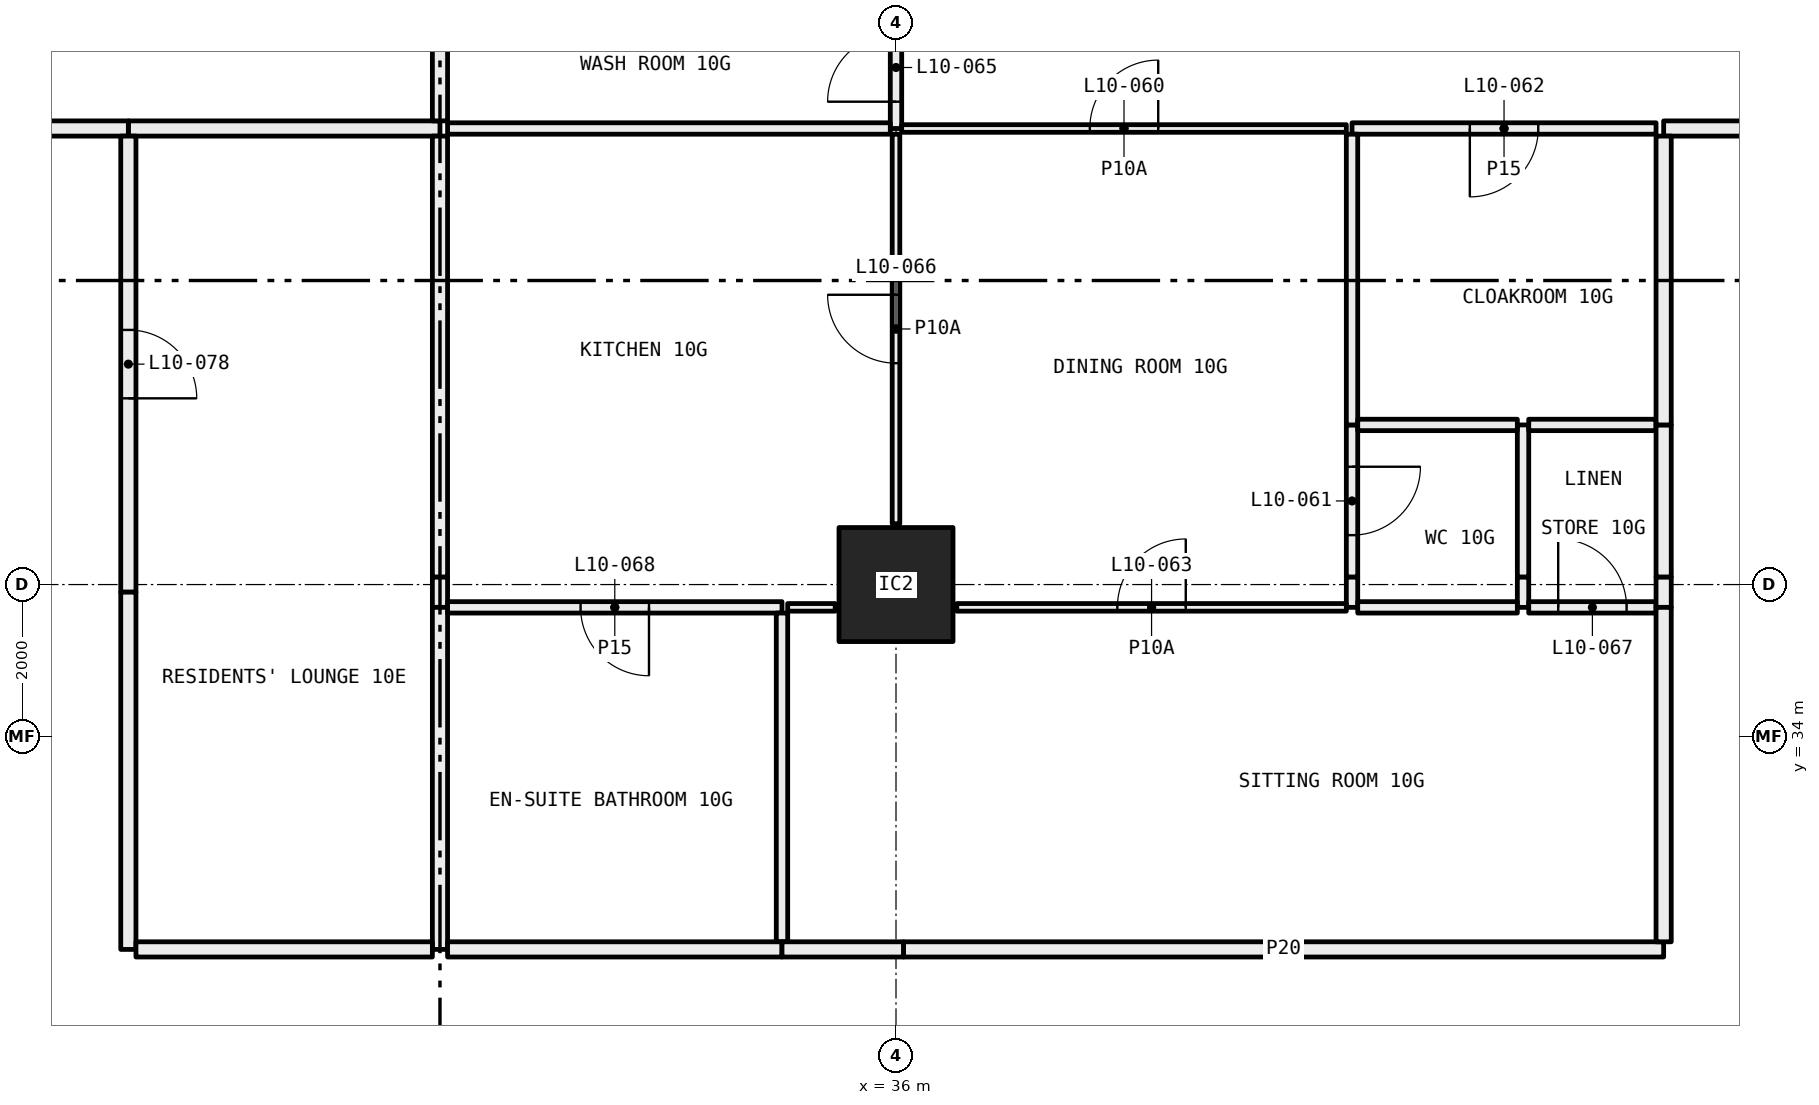
"""IFC4 building model, lengths in metres.
Left out: names, types, materials, properties, quantities, classifications, styles, units other than length and angle.
Written with IfcOpenShell. Run it as: python <this file> out.ifc"""

import sys

from ifc_helpers import new_model, si_unit, direction, frame, frame_2d, origin, origin_2d, place, context, subcontext, project, spatial, rectangle, hollow_rectangle, extrude, element, fill, save


model = new_model("IFC4")
c1 = context("Model", 3, precision=1e-05, world=origin(), true_north=direction((0.0, 1.0)))
c2 = subcontext(c1, "Body", "Model", "MODEL_VIEW")
j1 = project(units=[si_unit("LENGTHUNIT", "METRE"), si_unit("PLANEANGLEUNIT", "RADIAN")], contexts=[c1])
p1 = place(None, origin())
s1 = spatial("IfcSite", under=j1, at=p1, CompositionType="ELEMENT")
p2 = place(p1, origin())
s2 = spatial("IfcBuilding", under=s1, at=p2, CompositionType="ELEMENT")
p3 = place(p2, frame((0.0, 0.0, 47.25)))
s3 = spatial("IfcBuildingStorey", under=s2, at=p3, CompositionType="ELEMENT", Elevation=47.25)
p4 = place(p3, frame((36.0, 36.0, 0.0), z_axis=(0.0, 0.0, 1.0), x_axis=(1.0, 0.0, 0.0)))
e1 = element("IfcColumn", 1, at=p4, inside=s3, PredefinedType="COLUMN", context=c2, shape_type="SweptSolid", body=[
    extrude(hollow_rectangle(XDim=1.5, YDim=1.5, WallThickness=0.065, at=origin_2d()), origin(), (0.0, 0.0, 1.0), 3.05),
])
p5 = place(p3, frame((25.9, 42.0, 0.0), z_axis=(0.0, 0.0, 1.0), x_axis=(1.0, 0.0, 0.0)))
e2 = element("IfcWall", 2, at=p5, inside=s3, PredefinedType="PARTITIONING", context=c2, shape_type="SweptSolid", body=[
    extrude(rectangle(XDim=4.1, YDim=0.2, at=frame_2d((2.05, 0.0))), origin(), (0.0, 0.0, 1.0), 3.05),
])
p6 = place(p3, frame((30.0, 42.1, 0.0), z_axis=(0.0, 0.0, 1.0), x_axis=(0.0, 1.0, 0.0)))
e3 = element("IfcWall", 3, at=p6, inside=s3, PredefinedType="PARTITIONING", context=c2, shape_type="SweptSolid", body=[
    extrude(rectangle(XDim=1.58, YDim=0.2, at=frame_2d((0.79, 0.0))), origin(), (0.0, 0.0, 1.0), 3.05),
])
p7 = place(p3, frame((24.0, 42.0, 0.0), z_axis=(0.0, 0.0, 1.0), x_axis=(1.0, 0.0, 0.0)))
e4 = element("IfcWall", 4, at=p7, inside=s3, PredefinedType="PARTITIONING", context=c2, shape_type="SweptSolid", body=[
    extrude(rectangle(XDim=1.9, YDim=0.2, at=frame_2d((0.95, 0.0))), origin(), (0.0, 0.0, 1.0), 3.05),
])
p8 = place(p3, frame((30.0, 35.7, 0.0), z_axis=(0.0, 0.0, 1.0), x_axis=(0.0, 1.0, 0.0)))
e5 = element("IfcWall", 5, at=p8, inside=s3, PredefinedType="PARTITIONING", context=c2, shape_type="SweptSolid", body=[
    extrude(rectangle(XDim=0.4, YDim=0.2, at=frame_2d((0.2, 0.0))), origin(), (0.0, 0.0, 1.0), 2.45),
])
p9 = place(p3, frame((30.0, 36.1, 0.0), z_axis=(0.0, 0.0, 1.0), x_axis=(0.0, 1.0, 0.0)))
e6 = element("IfcWall", 6, at=p9, inside=s3, PredefinedType="PARTITIONING", context=c2, shape_type="SweptSolid", body=[
    extrude(rectangle(XDim=5.8, YDim=0.2, at=frame_2d((2.9, 0.0))), origin(), (0.0, 0.0, 1.0), 3.05),
])
p10 = place(p3, frame((30.0, 31.2, 0.0), z_axis=(0.0, 0.0, 1.0), x_axis=(0.0, 1.0, 0.0)))
e7 = element("IfcWall", 7, at=p10, inside=s3, PredefinedType="PARTITIONING", context=c2, shape_type="SweptSolid", body=[
    extrude(rectangle(XDim=4.5, YDim=0.2, at=frame_2d((2.25, 0.0))), origin(), (0.0, 0.0, 1.0), 3.05),
])
p11 = place(p3, frame((25.9, 41.9, 0.0), z_axis=(0.0, 0.0, 1.0), x_axis=(0.0, -1.0, 0.0)))
e8 = element("IfcWall", 8, at=p11, inside=s3, PredefinedType="PARTITIONING", context=c2, shape_type="SweptSolid", body=[
    extrude(rectangle(XDim=6.0, YDim=0.2, at=frame_2d((3.0, 0.0))), origin(), (0.0, 0.0, 1.0), 2.45),
])
p12 = place(p11, frame((2.55, 0.0, 0.0)))
e9 = element("IfcOpeningElement", 9, at=p12, cuts=e8, PredefinedType="OPENING", context=c2, shape_type="SweptSolid", body=[
    extrude(rectangle(XDim=0.9, YDim=2.1, at=frame_2d((0.45, 1.05))), frame((0.0, 0.11, 0.0), z_axis=(0.0, -1.0, 0.0), x_axis=(1.0, 0.0, 0.0)), (0.0, 0.0, 1.0), 0.22),
])
p13 = place(p3, frame((25.9, 35.9, 0.0), z_axis=(0.0, 0.0, 1.0), x_axis=(0.0, -1.0, 0.0)))
e10 = element("IfcWall", 10, at=p13, inside=s3, PredefinedType="PARTITIONING", context=c2, shape_type="SweptSolid", body=[
    extrude(rectangle(XDim=4.7, YDim=0.2, at=frame_2d((2.35, 0.0))), origin(), (0.0, 0.0, 1.0), 3.05),
])
p14 = place(p3, frame((26.0, 31.2, 0.0), z_axis=(0.0, 0.0, 1.0), x_axis=(1.0, 0.0, 0.0)))
e11 = element("IfcWall", 11, at=p14, inside=s3, PredefinedType="PARTITIONING", context=c2, shape_type="SweptSolid", body=[
    extrude(rectangle(XDim=3.9, YDim=0.2, at=frame_2d((1.95, 0.0))), origin(), (0.0, 0.0, 1.0), 3.05),
])
p15 = place(p3, frame((36.0, 42.0, 0.0), z_axis=(0.0, 0.0, 1.0), x_axis=(0.0, 1.0, 0.0)))
e12 = element("IfcWall", 12, at=p15, inside=s3, PredefinedType="PARTITIONING", context=c2, shape_type="SweptSolid", body=[
    extrude(rectangle(XDim=1.605, YDim=0.15, at=frame_2d((0.802, 0.0))), origin(), (0.0, 0.0, 1.0), 2.45),
])
p16 = place(p15, frame((0.353, 0.0, 0.0)))
e13 = element("IfcOpeningElement", 13, at=p16, cuts=e12, PredefinedType="OPENING", context=c2, shape_type="SweptSolid", body=[
    extrude(rectangle(XDim=0.9, YDim=2.1, at=frame_2d((0.45, 1.05))), frame((0.0, 0.085, 0.0), z_axis=(0.0, -1.0, 0.0), x_axis=(1.0, 0.0, 0.0)), (0.0, 0.0, 1.0), 0.17),
])
p17 = place(p3, frame((30.1, 42.0, 0.0), z_axis=(0.0, 0.0, 1.0), x_axis=(1.0, 0.0, 0.0)))
e14 = element("IfcWall", 14, at=p17, inside=s3, PredefinedType="PARTITIONING", context=c2, shape_type="SweptSolid", body=[
    extrude(rectangle(XDim=5.825, YDim=0.15, at=frame_2d((2.913, 0.0))), origin(), (0.0, 0.0, 1.0), 2.45),
])
p18 = place(p3, frame((36.075, 42.0, 0.0), z_axis=(0.0, 0.0, 1.0), x_axis=(1.0, 0.0, 0.0)))
e15 = element("IfcWall", 15, at=p18, inside=s3, PredefinedType="PARTITIONING", context=c2, shape_type="SweptSolid", body=[
    extrude(rectangle(XDim=5.85, YDim=0.1, at=frame_2d((2.925, 0.0))), origin(), (0.0, 0.0, 1.0), 2.45),
])
p19 = place(p18, frame((2.475, 0.0, 0.0)))
e16 = element("IfcOpeningElement", 16, at=p19, cuts=e15, PredefinedType="OPENING", context=c2, shape_type="SweptSolid", body=[
    extrude(rectangle(XDim=0.9, YDim=2.1, at=frame_2d((0.45, 1.05))), frame((0.0, 0.06, 0.0), z_axis=(0.0, -1.0, 0.0), x_axis=(1.0, 0.0, 0.0)), (0.0, 0.0, 1.0), 0.12),
])
p20 = place(p3, frame((42.0, 42.0, 0.0), z_axis=(0.0, 0.0, 1.0), x_axis=(1.0, 0.0, 0.0)))
e17 = element("IfcWall", 17, at=p20, inside=s3, PredefinedType="PARTITIONING", context=c2, shape_type="SweptSolid", body=[
    extrude(rectangle(XDim=4.0, YDim=0.15, at=frame_2d((2.0, 0.0))), origin(), (0.0, 0.0, 1.0), 3.05),
])
p21 = place(p20, frame((1.55, 0.0, 0.0)))
e18 = element("IfcOpeningElement", 18, at=p21, cuts=e17, PredefinedType="OPENING", context=c2, shape_type="SweptSolid", body=[
    extrude(rectangle(XDim=0.9, YDim=2.1, at=frame_2d((0.45, 1.05))), frame((0.0, 0.085, 0.0), z_axis=(0.0, -1.0, 0.0), x_axis=(1.0, 0.0, 0.0)), (0.0, 0.0, 1.0), 0.17),
])
p22 = place(p3, frame((46.1, 42.0, 0.0), z_axis=(0.0, 0.0, 1.0), x_axis=(1.0, 0.0, 0.0)))
e19 = element("IfcWall", 19, at=p22, inside=s3, PredefinedType="PARTITIONING", context=c2, shape_type="SweptSolid", body=[
    extrude(rectangle(XDim=1.9, YDim=0.2, at=frame_2d((0.95, 0.0))), origin(), (0.0, 0.0, 1.0), 3.05),
])
p23 = place(p3, frame((36.0, 36.8, 0.0), z_axis=(0.0, 0.0, 1.0), x_axis=(0.0, 1.0, 0.0)))
e20 = element("IfcWall", 20, at=p23, inside=s3, PredefinedType="PARTITIONING", context=c2, shape_type="SweptSolid", body=[
    extrude(rectangle(XDim=5.125, YDim=0.1, at=frame_2d((2.562, 0.0))), origin(), (0.0, 0.0, 1.0), 2.45),
])
p24 = place(p23, frame((2.113, 0.0, 0.0)))
e21 = element("IfcOpeningElement", 21, at=p24, cuts=e20, PredefinedType="OPENING", context=c2, shape_type="SweptSolid", body=[
    extrude(rectangle(XDim=0.9, YDim=2.1, at=frame_2d((0.45, 1.05))), frame((0.0, 0.06, 0.0), z_axis=(0.0, -1.0, 0.0), x_axis=(1.0, 0.0, 0.0)), (0.0, 0.0, 1.0), 0.12),
])
p25 = place(p3, frame((30.1, 35.7, 0.0), z_axis=(0.0, 0.0, 1.0), x_axis=(1.0, 0.0, 0.0)))
e22 = element("IfcWall", 22, at=p25, inside=s3, PredefinedType="PARTITIONING", context=c2, shape_type="SweptSolid", body=[
    extrude(rectangle(XDim=4.4, YDim=0.15, at=frame_2d((2.2, 0.0))), origin(), (0.0, 0.0, 1.0), 3.05),
])
p26 = place(p25, frame((1.75, 0.0, 0.0)))
e23 = element("IfcOpeningElement", 23, at=p26, cuts=e22, PredefinedType="OPENING", context=c2, shape_type="SweptSolid", body=[
    extrude(rectangle(XDim=0.9, YDim=2.1, at=frame_2d((0.45, 1.05))), frame((0.0, 0.085, 0.0), z_axis=(0.0, -1.0, 0.0), x_axis=(1.0, 0.0, 0.0)), (0.0, 0.0, 1.0), 0.17),
])
p27 = place(p3, frame((34.575, 35.7, 0.0), z_axis=(0.0, 0.0, 1.0), x_axis=(1.0, 0.0, 0.0)))
e24 = element("IfcWall", 24, at=p27, inside=s3, PredefinedType="PARTITIONING", context=c2, shape_type="SweptSolid", body=[
    extrude(rectangle(XDim=0.625, YDim=0.1, at=frame_2d((0.312, 0.0))), origin(), (0.0, 0.0, 1.0), 3.05),
])
p28 = place(p3, frame((42.0, 35.7, 0.0), z_axis=(0.0, 0.0, 1.0), x_axis=(0.0, 1.0, 0.0)))
e25 = element("IfcWall", 25, at=p28, inside=s3, PredefinedType="PARTITIONING", context=c2, shape_type="SweptSolid", body=[
    extrude(rectangle(XDim=0.4, YDim=0.15, at=frame_2d((0.2, 0.0))), origin(), (0.0, 0.0, 1.0), 2.45),
])
p29 = place(p3, frame((42.0, 36.1, 0.0), z_axis=(0.0, 0.0, 1.0), x_axis=(0.0, 1.0, 0.0)))
e26 = element("IfcWall", 26, at=p29, inside=s3, PredefinedType="PARTITIONING", context=c2, shape_type="SweptSolid", body=[
    extrude(rectangle(XDim=2.0, YDim=0.15, at=frame_2d((1.0, 0.0))), origin(), (0.0, 0.0, 1.0), 3.05),
])
p30 = place(p29, frame((0.55, 0.0, 0.0)))
e27 = element("IfcOpeningElement", 27, at=p30, cuts=e26, PredefinedType="OPENING", context=c2, shape_type="SweptSolid", body=[
    extrude(rectangle(XDim=0.9, YDim=2.1, at=frame_2d((0.45, 1.05))), frame((0.0, 0.085, 0.0), z_axis=(0.0, -1.0, 0.0), x_axis=(1.0, 0.0, 0.0)), (0.0, 0.0, 1.0), 0.17),
])
p31 = place(p3, frame((42.0, 38.1, 0.0), z_axis=(0.0, 0.0, 1.0), x_axis=(0.0, 1.0, 0.0)))
e28 = element("IfcWall", 28, at=p31, inside=s3, PredefinedType="PARTITIONING", context=c2, shape_type="SweptSolid", body=[
    extrude(rectangle(XDim=3.825, YDim=0.15, at=frame_2d((1.913, 0.0))), origin(), (0.0, 0.0, 1.0), 3.05),
])
p32 = place(p3, frame((36.8, 35.7, 0.0), z_axis=(0.0, 0.0, 1.0), x_axis=(1.0, 0.0, 0.0)))
e29 = element("IfcWall", 29, at=p32, inside=s3, PredefinedType="PARTITIONING", context=c2, shape_type="SweptSolid", body=[
    extrude(rectangle(XDim=5.125, YDim=0.1, at=frame_2d((2.562, 0.0))), origin(), (0.0, 0.0, 1.0), 3.05),
])
p33 = place(p32, frame((2.113, 0.0, 0.0)))
e30 = element("IfcOpeningElement", 30, at=p33, cuts=e29, PredefinedType="OPENING", context=c2, shape_type="SweptSolid", body=[
    extrude(rectangle(XDim=0.9, YDim=2.1, at=frame_2d((0.45, 1.05))), frame((0.0, 0.06, 0.0), z_axis=(0.0, -1.0, 0.0), x_axis=(1.0, 0.0, 0.0)), (0.0, 0.0, 1.0), 0.12),
])
p34 = place(p3, frame((44.25, 35.7, 0.0), z_axis=(0.0, 0.0, 1.0), x_axis=(0.0, 1.0, 0.0)))
e31 = element("IfcWall", 31, at=p34, inside=s3, PredefinedType="PARTITIONING", context=c2, shape_type="SweptSolid", body=[
    extrude(rectangle(XDim=0.4, YDim=0.15, at=frame_2d((0.2, 0.0))), origin(), (0.0, 0.0, 1.0), 2.45),
])
p35 = place(p3, frame((44.25, 36.1, 0.0), z_axis=(0.0, 0.0, 1.0), x_axis=(0.0, 1.0, 0.0)))
e32 = element("IfcWall", 32, at=p35, inside=s3, PredefinedType="PARTITIONING", context=c2, shape_type="SweptSolid", body=[
    extrude(rectangle(XDim=2.0, YDim=0.15, at=frame_2d((1.0, 0.0))), origin(), (0.0, 0.0, 1.0), 3.05),
])
for number, where, z_axis, x_axis in (
    (33, (44.175, 38.1, 0.0), (0.0, 0.0, 1.0), (-1.0, 0.0, 0.0)),
    (34, (42.075, 35.7, 0.0), (0.0, 0.0, 1.0), (1.0, 0.0, 0.0)),
):
    element("IfcWall", number, at=place(p3, frame(where, z_axis=z_axis, x_axis=x_axis)), inside=s3, PredefinedType="PARTITIONING", context=c2, shape_type="SweptSolid", body=[
        extrude(rectangle(XDim=2.1, YDim=0.15, at=frame_2d((1.05, 0.0))), origin(), (0.0, 0.0, 1.0), 3.05),
    ])
p36 = place(p3, frame((46.0, 38.1, 0.0), z_axis=(0.0, 0.0, 1.0), x_axis=(-1.0, 0.0, 0.0)))
e35 = element("IfcWall", 35, at=p36, inside=s3, PredefinedType="PARTITIONING", context=c2, shape_type="SweptSolid", body=[
    extrude(rectangle(XDim=1.675, YDim=0.15, at=frame_2d((0.837, 0.0))), origin(), (0.0, 0.0, 1.0), 3.05),
])
p37 = place(p3, frame((44.325, 35.7, 0.0), z_axis=(0.0, 0.0, 1.0), x_axis=(1.0, 0.0, 0.0)))
e36 = element("IfcWall", 36, at=p37, inside=s3, PredefinedType="PARTITIONING", context=c2, shape_type="SweptSolid", body=[
    extrude(rectangle(XDim=1.675, YDim=0.15, at=frame_2d((0.837, 0.0))), origin(), (0.0, 0.0, 1.0), 3.05),
])
p38 = place(p37, frame((0.387, 0.0, 0.0)))
e37 = element("IfcOpeningElement", 37, at=p38, cuts=e36, PredefinedType="OPENING", context=c2, shape_type="SweptSolid", body=[
    extrude(rectangle(XDim=0.9, YDim=2.1, at=frame_2d((0.45, 1.05))), frame((0.0, 0.085, 0.0), z_axis=(0.0, -1.0, 0.0), x_axis=(1.0, 0.0, 0.0)), (0.0, 0.0, 1.0), 0.17),
])
p39 = place(p3, frame((46.1, 35.7, 0.0), z_axis=(0.0, 0.0, 1.0), x_axis=(0.0, 1.0, 0.0)))
e38 = element("IfcWall", 38, at=p39, inside=s3, PredefinedType="PARTITIONING", context=c2, shape_type="SweptSolid", body=[
    extrude(rectangle(XDim=0.4, YDim=0.2, at=frame_2d((0.2, 0.0))), origin(), (0.0, 0.0, 1.0), 2.45),
])
p40 = place(p3, frame((46.1, 36.1, 0.0), z_axis=(0.0, 0.0, 1.0), x_axis=(0.0, 1.0, 0.0)))
e39 = element("IfcWall", 39, at=p40, inside=s3, PredefinedType="PARTITIONING", context=c2, shape_type="SweptSolid", body=[
    extrude(rectangle(XDim=2.0, YDim=0.2, at=frame_2d((1.0, 0.0))), origin(), (0.0, 0.0, 1.0), 3.05),
])
p41 = place(p3, frame((46.1, 38.1, 0.0), z_axis=(0.0, 0.0, 1.0), x_axis=(0.0, 1.0, 0.0)))
e40 = element("IfcWall", 40, at=p41, inside=s3, PredefinedType="PARTITIONING", context=c2, shape_type="SweptSolid", body=[
    extrude(rectangle(XDim=3.8, YDim=0.2, at=frame_2d((1.9, 0.0))), origin(), (0.0, 0.0, 1.0), 3.05),
])
p42 = place(p3, frame((34.5, 31.3, 0.0), z_axis=(0.0, 0.0, 1.0), x_axis=(0.0, 1.0, 0.0)))
e41 = element("IfcWall", 41, at=p42, inside=s3, PredefinedType="PARTITIONING", context=c2, shape_type="SweptSolid", body=[
    extrude(rectangle(XDim=4.325, YDim=0.15, at=frame_2d((2.163, 0.0))), origin(), (0.0, 0.0, 1.0), 3.05),
])
p43 = place(p3, frame((30.1, 31.2, 0.0), z_axis=(0.0, 0.0, 1.0), x_axis=(1.0, 0.0, 0.0)))
e42 = element("IfcWall", 42, at=p43, inside=s3, PredefinedType="PARTITIONING", context=c2, shape_type="SweptSolid", body=[
    extrude(rectangle(XDim=4.4, YDim=0.2, at=frame_2d((2.2, 0.0))), origin(), (0.0, 0.0, 1.0), 3.05),
])
p44 = place(p3, frame((34.5, 31.2, 0.0), z_axis=(0.0, 0.0, 1.0), x_axis=(1.0, 0.0, 0.0)))
e43 = element("IfcWall", 43, at=p44, inside=s3, PredefinedType="PARTITIONING", context=c2, shape_type="SweptSolid", body=[
    extrude(rectangle(XDim=1.6, YDim=0.2, at=frame_2d((0.8, 0.0))), origin(), (0.0, 0.0, 1.0), 2.45),
])
p45 = place(p3, frame((36.1, 31.2, 0.0), z_axis=(0.0, 0.0, 1.0), x_axis=(1.0, 0.0, 0.0)))
e44 = element("IfcWall", 44, at=p45, inside=s3, PredefinedType="PARTITIONING", context=c2, shape_type="SweptSolid", body=[
    extrude(rectangle(XDim=10.0, YDim=0.2, at=frame_2d((5.0, 0.0))), origin(), (0.0, 0.0, 1.0), 3.05),
])
p46 = place(p3, frame((46.1, 31.3, 0.0), z_axis=(0.0, 0.0, 1.0), x_axis=(0.0, 1.0, 0.0)))
e45 = element("IfcWall", 45, at=p46, inside=s3, PredefinedType="PARTITIONING", context=c2, shape_type="SweptSolid", body=[
    extrude(rectangle(XDim=4.4, YDim=0.2, at=frame_2d((2.2, 0.0))), origin(), (0.0, 0.0, 1.0), 3.05),
])
p47 = place(p19, origin())
e46 = element("IfcDoor", 46, at=p47, inside=s3, OperationType="SINGLE_SWING_LEFT", PredefinedType="DOOR", context=c2, shape_type="SweptSolid", body=[
    extrude(rectangle(XDim=0.9, YDim=2.1, at=frame_2d((0.45, 1.05))), frame((0.0, 0.025, 0.0), z_axis=(0.0, -1.0, 0.0), x_axis=(1.0, 0.0, 0.0)), (0.0, 0.0, 1.0), 0.05),
])
fill(e16, e46)
p48 = place(p30, frame((0.9, 0.0, 0.0), x_axis=(-1.0, 0.0, 0.0)))
e47 = element("IfcDoor", 47, at=p48, inside=s3, OperationType="SINGLE_SWING_RIGHT", PredefinedType="DOOR", context=c2, shape_type="SweptSolid", body=[
    extrude(rectangle(XDim=0.9, YDim=2.1, at=frame_2d((0.45, 1.05))), frame((0.0, 0.025, 0.0), z_axis=(0.0, -1.0, 0.0), x_axis=(1.0, 0.0, 0.0)), (0.0, 0.0, 1.0), 0.05),
])
fill(e27, e47)
p49 = place(p21, frame((0.9, 0.0, 0.0), x_axis=(-1.0, 0.0, 0.0)))
e48 = element("IfcDoor", 48, at=p49, inside=s3, OperationType="SINGLE_SWING_LEFT", PredefinedType="DOOR", context=c2, shape_type="SweptSolid", body=[
    extrude(rectangle(XDim=0.9, YDim=2.1, at=frame_2d((0.45, 1.05))), frame((0.0, 0.025, 0.0), z_axis=(0.0, -1.0, 0.0), x_axis=(1.0, 0.0, 0.0)), (0.0, 0.0, 1.0), 0.05),
])
fill(e18, e48)
p50 = place(p33, origin())
e49 = element("IfcDoor", 49, at=p50, inside=s3, OperationType="SINGLE_SWING_LEFT", PredefinedType="DOOR", context=c2, shape_type="SweptSolid", body=[
    extrude(rectangle(XDim=0.9, YDim=2.1, at=frame_2d((0.45, 1.05))), frame((0.0, 0.025, 0.0), z_axis=(0.0, -1.0, 0.0), x_axis=(1.0, 0.0, 0.0)), (0.0, 0.0, 1.0), 0.05),
])
fill(e30, e49)
p51 = place(p16, origin())
e50 = element("IfcDoor", 50, at=p51, inside=s3, OperationType="SINGLE_SWING_RIGHT", PredefinedType="DOOR", context=c2, shape_type="SweptSolid", body=[
    extrude(rectangle(XDim=0.9, YDim=2.1, at=frame_2d((0.45, 1.05))), frame((0.0, 0.025, 0.0), z_axis=(0.0, -1.0, 0.0), x_axis=(1.0, 0.0, 0.0)), (0.0, 0.0, 1.0), 0.05),
])
fill(e13, e50)
p52 = place(p24, origin())
e51 = element("IfcDoor", 51, at=p52, inside=s3, OperationType="SINGLE_SWING_LEFT", PredefinedType="DOOR", context=c2, shape_type="SweptSolid", body=[
    extrude(rectangle(XDim=0.9, YDim=2.1, at=frame_2d((0.45, 1.05))), frame((0.0, 0.025, 0.0), z_axis=(0.0, -1.0, 0.0), x_axis=(1.0, 0.0, 0.0)), (0.0, 0.0, 1.0), 0.05),
])
fill(e21, e51)
p53 = place(p38, origin())
e52 = element("IfcDoor", 52, at=p53, inside=s3, OperationType="SINGLE_SWING_RIGHT", PredefinedType="DOOR", context=c2, shape_type="SweptSolid", body=[
    extrude(rectangle(XDim=0.9, YDim=2.1, at=frame_2d((0.45, 1.05))), frame((0.0, 0.025, 0.0), z_axis=(0.0, -1.0, 0.0), x_axis=(1.0, 0.0, 0.0)), (0.0, 0.0, 1.0), 0.05),
])
fill(e37, e52)
p54 = place(p26, frame((0.9, 0.0, 0.0), x_axis=(-1.0, 0.0, 0.0)))
e53 = element("IfcDoor", 53, at=p54, inside=s3, OperationType="SINGLE_SWING_RIGHT", PredefinedType="DOOR", context=c2, shape_type="SweptSolid", body=[
    extrude(rectangle(XDim=0.9, YDim=2.1, at=frame_2d((0.45, 1.05))), frame((0.0, 0.025, 0.0), z_axis=(0.0, -1.0, 0.0), x_axis=(1.0, 0.0, 0.0)), (0.0, 0.0, 1.0), 0.05),
])
fill(e23, e53)
p55 = place(p12, origin())
e54 = element("IfcDoor", 54, at=p55, inside=s3, OperationType="SINGLE_SWING_LEFT", PredefinedType="DOOR", context=c2, shape_type="SweptSolid", body=[
    extrude(rectangle(XDim=0.9, YDim=2.1, at=frame_2d((0.45, 1.05))), frame((0.0, 0.025, 0.0), z_axis=(0.0, -1.0, 0.0), x_axis=(1.0, 0.0, 0.0)), (0.0, 0.0, 1.0), 0.05),
])
fill(e9, e54)
save(model, sys.argv[1])
